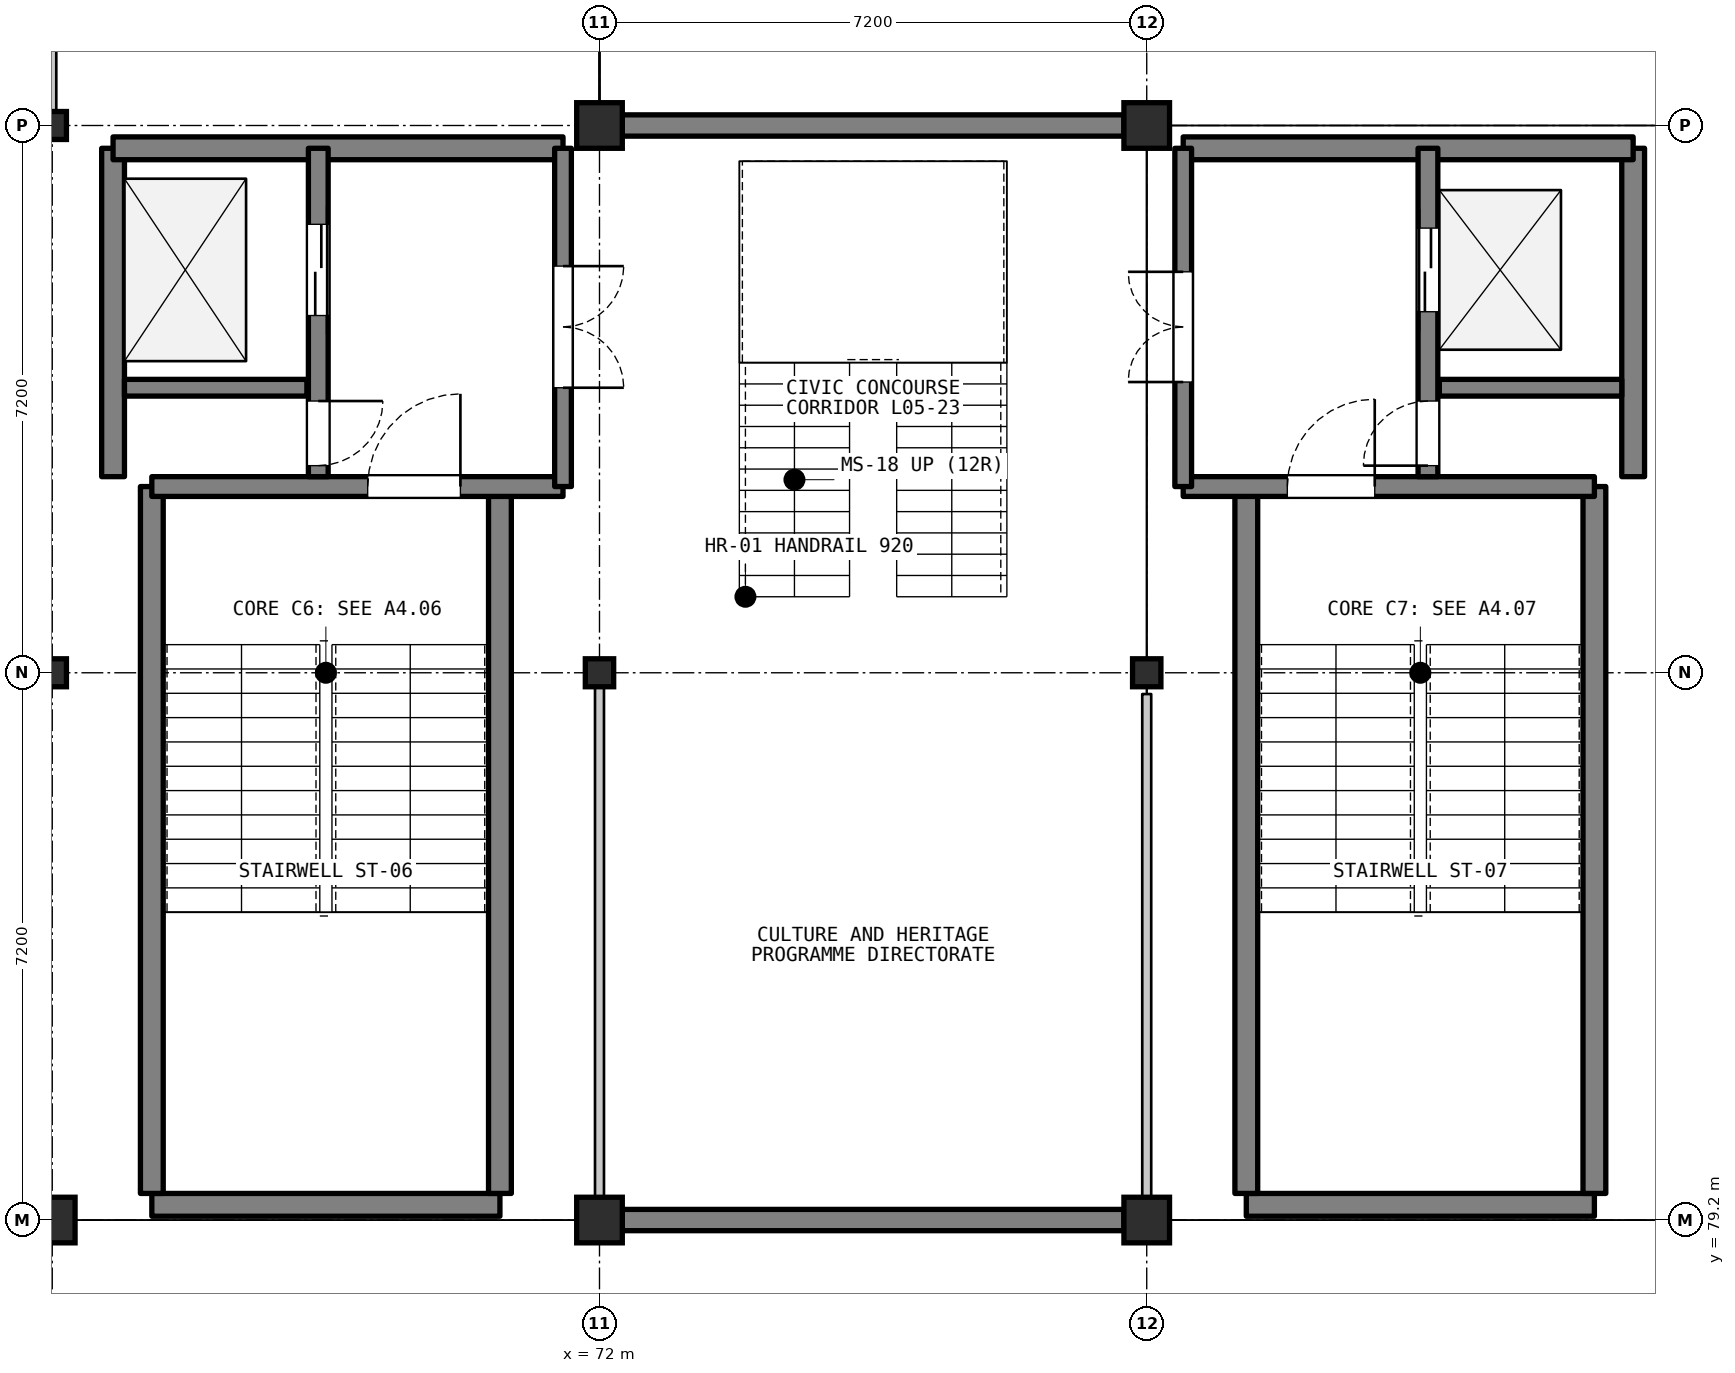
"""IFC4 building model, lengths in metres.
Left out: names, types, materials, properties, quantities, classifications, styles, units other than length and angle.
Written with IfcOpenShell. Run it as: python <this file> out.ifc"""

import sys

from ifc_helpers import new_model, si_unit, direction, frame, frame_2d, origin, origin_2d, place, context, subcontext, project, spatial, rectangle, i_section, extrude, element, fill, save


model = new_model("IFC4")
c1 = context("Model", 3, precision=1e-05, world=origin(), true_north=direction((0.0, 1.0)))
c2 = subcontext(c1, "Body", "Model", "MODEL_VIEW")
j1 = project(units=[si_unit("LENGTHUNIT", "METRE"), si_unit("PLANEANGLEUNIT", "RADIAN")], contexts=[c1])
p1 = place(None, origin())
s1 = spatial("IfcSite", under=j1, at=p1, CompositionType="ELEMENT")
p2 = place(p1, origin())
s2 = spatial("IfcBuilding", under=s1, at=p2, CompositionType="ELEMENT")
p3 = place(p2, frame((0.0, 0.0, 18.0)))
s3 = spatial("IfcBuildingStorey", under=s2, at=p3, CompositionType="ELEMENT", Elevation=18.0)
p4 = place(p3, frame((64.8, 79.2, 0.0), z_axis=(0.0, 0.0, 1.0), x_axis=(1.0, 0.0, 0.0)))
e1 = element("IfcColumn", 1, at=p4, inside=s3, PredefinedType="COLUMN", context=c2, shape_type="SweptSolid", body=[
    extrude(rectangle(XDim=0.6, YDim=0.6, at=origin_2d()), origin(), (0.0, 0.0, 1.0), 3.9),
])
for number, where, z_axis, x_axis in (
    (2, (64.8, 86.4, 0.0), (0.0, 0.0, 1.0), (1.0, 0.0, 0.0)),
    (3, (64.8, 93.6, 0.0), (0.0, 0.0, 1.0), (1.0, 0.0, 0.0)),
):
    element("IfcColumn", number, at=place(p3, frame(where, z_axis=z_axis, x_axis=x_axis)), inside=s3, PredefinedType="COLUMN", context=c2, shape_type="SweptSolid", body=[
        extrude(i_section(OverallWidth=0.373, OverallDepth=0.368, WebThickness=0.015, FlangeThickness=0.024, FilletRadius=0.015, at=origin_2d()), origin(), (0.0, 0.0, 1.0), 3.9),
    ])
p5 = place(p3, frame((72.0, 79.2, 0.0), z_axis=(0.0, 0.0, 1.0), x_axis=(1.0, 0.0, 0.0)))
e4 = element("IfcColumn", 4, at=p5, inside=s3, PredefinedType="COLUMN", context=c2, shape_type="SweptSolid", body=[
    extrude(rectangle(XDim=0.6, YDim=0.6, at=origin_2d()), origin(), (0.0, 0.0, 1.0), 3.9),
])
p6 = place(p3, frame((72.0, 86.4, 0.0), z_axis=(0.0, 0.0, 1.0), x_axis=(1.0, 0.0, 0.0)))
e5 = element("IfcColumn", 5, at=p6, inside=s3, PredefinedType="COLUMN", context=c2, shape_type="SweptSolid", body=[
    extrude(i_section(OverallWidth=0.373, OverallDepth=0.368, WebThickness=0.015, FlangeThickness=0.024, FilletRadius=0.015, at=origin_2d()), origin(), (0.0, 0.0, 1.0), 3.9),
])
for number, where, z_axis, x_axis in (
    (6, (72.0, 93.6, 0.0), (0.0, 0.0, 1.0), (1.0, 0.0, 0.0)),
    (7, (79.2, 79.2, 0.0), (0.0, 0.0, 1.0), (1.0, 0.0, 0.0)),
):
    element("IfcColumn", number, at=place(p3, frame(where, z_axis=z_axis, x_axis=x_axis)), inside=s3, PredefinedType="COLUMN", context=c2, shape_type="SweptSolid", body=[
        extrude(rectangle(XDim=0.6, YDim=0.6, at=origin_2d()), origin(), (0.0, 0.0, 1.0), 3.9),
    ])
p7 = place(p3, frame((79.2, 86.4, 0.0), z_axis=(0.0, 0.0, 1.0), x_axis=(1.0, 0.0, 0.0)))
e8 = element("IfcColumn", 8, at=p7, inside=s3, PredefinedType="COLUMN", context=c2, shape_type="SweptSolid", body=[
    extrude(i_section(OverallWidth=0.373, OverallDepth=0.368, WebThickness=0.015, FlangeThickness=0.024, FilletRadius=0.015, at=origin_2d()), origin(), (0.0, 0.0, 1.0), 3.9),
])
p8 = place(p3, frame((79.2, 93.6, 0.0), z_axis=(0.0, 0.0, 1.0), x_axis=(1.0, 0.0, 0.0)))
e9 = element("IfcColumn", 9, at=p8, inside=s3, PredefinedType="COLUMN", context=c2, shape_type="SweptSolid", body=[
    extrude(rectangle(XDim=0.6, YDim=0.6, at=origin_2d()), origin(), (0.0, 0.0, 1.0), 3.9),
])
for number, where, z_axis, x_axis in (
    (10, (78.9, 79.2, 0.0), (0.0, 0.0, 1.0), (-1.0, 0.0, 0.0)),
    (11, (72.3, 93.6, 0.0), (0.0, 0.0, 1.0), (1.0, 0.0, 0.0)),
):
    element("IfcWall", number, at=place(p3, frame(where, z_axis=z_axis, x_axis=x_axis)), inside=s3, PredefinedType="SOLIDWALL", context=c2, shape_type="SweptSolid", body=[
        extrude(rectangle(XDim=6.6, YDim=0.28, at=frame_2d((3.3, 0.0))), origin(), (0.0, 0.0, 1.0), 3.192),
    ])
p9 = place(p3, frame((66.11, 79.4, 0.0), z_axis=(0.0, 0.0, 1.0), x_axis=(1.0, 0.0, 0.0)))
e12 = element("IfcWall", 12, at=p9, inside=s3, PredefinedType="SHEAR", context=c2, shape_type="SweptSolid", body=[
    extrude(rectangle(XDim=4.58, YDim=0.3, at=frame_2d((2.29, 0.0))), origin(), (0.0, 0.0, 1.0), 3.72),
])
for number, where, z_axis, x_axis in (
    (13, (66.11, 79.55, 0.0), (0.0, 0.0, 1.0), (0.0, 1.0, 0.0)),
    (14, (70.69, 79.55, 0.0), (0.0, 0.0, 1.0), (0.0, 1.0, 0.0)),
):
    element("IfcWall", number, at=place(p3, frame(where, z_axis=z_axis, x_axis=x_axis)), inside=s3, PredefinedType="SHEAR", context=c2, shape_type="SweptSolid", body=[
        extrude(rectangle(XDim=9.3, YDim=0.3, at=frame_2d((4.65, 0.0))), origin(), (0.0, 0.0, 1.0), 3.72),
    ])
p10 = place(p3, frame((66.11, 88.85, 0.0), z_axis=(0.0, 0.0, 1.0), x_axis=(1.0, 0.0, 0.0)))
e15 = element("IfcWall", 15, at=p10, inside=s3, PredefinedType="SHEAR", context=c2, shape_type="SweptSolid", body=[
    extrude(rectangle(XDim=5.41, YDim=0.26, at=frame_2d((2.705, 0.0))), origin(), (0.0, 0.0, 1.0), 3.72),
])
p11 = place(p10, frame((2.84, 0.0, 0.0)))
e16 = element("IfcOpeningElement", 16, at=p11, cuts=e15, PredefinedType="OPENING", context=c2, shape_type="SweptSolid", body=[
    extrude(rectangle(XDim=1.22, YDim=2.15, at=frame_2d((0.61, 1.075))), frame((0.0, 0.14, 0.0), z_axis=(0.0, -1.0, 0.0), x_axis=(1.0, 0.0, 0.0)), (0.0, 0.0, 1.0), 0.28),
])
p12 = place(p3, frame((65.6, 88.98, 0.0), z_axis=(0.0, 0.0, 1.0), x_axis=(0.0, 1.0, 0.0)))
e17 = element("IfcWall", 17, at=p12, inside=s3, PredefinedType="SHEAR", context=c2, shape_type="SweptSolid", body=[
    extrude(rectangle(XDim=4.32, YDim=0.3, at=frame_2d((2.16, 0.0))), origin(), (0.0, 0.0, 1.0), 3.72),
])
p13 = place(p3, frame((65.6, 93.3, 0.0), z_axis=(0.0, 0.0, 1.0), x_axis=(1.0, 0.0, 0.0)))
e18 = element("IfcWall", 18, at=p13, inside=s3, PredefinedType="SHEAR", context=c2, shape_type="SweptSolid", body=[
    extrude(rectangle(XDim=5.92, YDim=0.3, at=frame_2d((2.96, 0.0))), origin(), (0.0, 0.0, 1.0), 3.72),
])
p14 = place(p3, frame((65.75, 90.15, 0.0), z_axis=(0.0, 0.0, 1.0), x_axis=(1.0, 0.0, 0.0)))
e19 = element("IfcWall", 19, at=p14, inside=s3, PredefinedType="SHEAR", context=c2, shape_type="SweptSolid", body=[
    extrude(rectangle(XDim=2.4, YDim=0.22, at=frame_2d((1.2, 0.0))), origin(), (0.0, 0.0, 1.0), 3.72),
])
p15 = place(p3, frame((68.3, 93.3, 0.0), z_axis=(0.0, 0.0, 1.0), x_axis=(0.0, -1.0, 0.0)))
e20 = element("IfcWall", 20, at=p15, inside=s3, PredefinedType="SHEAR", context=c2, shape_type="SweptSolid", body=[
    extrude(rectangle(XDim=4.32, YDim=0.26, at=frame_2d((2.16, 0.0))), origin(), (0.0, 0.0, 1.0), 3.72),
])
p16 = place(p15, frame((1.0, 0.0, 0.0)))
e21 = element("IfcOpeningElement", 21, at=p16, cuts=e20, PredefinedType="OPENING", context=c2, shape_type="SweptSolid", body=[
    extrude(rectangle(XDim=1.2, YDim=2.15, at=frame_2d((0.6, 1.075))), frame((0.0, 0.14, 0.0), z_axis=(0.0, -1.0, 0.0), x_axis=(1.0, 0.0, 0.0)), (0.0, 0.0, 1.0), 0.28),
])
p17 = place(p15, frame((3.325, 0.0, 0.0)))
e22 = element("IfcOpeningElement", 22, at=p17, cuts=e20, PredefinedType="OPENING", context=c2, shape_type="SweptSolid", body=[
    extrude(rectangle(XDim=0.85, YDim=2.05, at=frame_2d((0.425, 1.025))), frame((0.0, 0.14, 0.0), z_axis=(0.0, -1.0, 0.0), x_axis=(1.0, 0.0, 0.0)), (0.0, 0.0, 1.0), 0.28),
])
p18 = place(p3, frame((71.52, 93.3, 0.0), z_axis=(0.0, 0.0, 1.0), x_axis=(0.0, -1.0, 0.0)))
e23 = element("IfcWall", 23, at=p18, inside=s3, PredefinedType="SHEAR", context=c2, shape_type="SweptSolid", body=[
    extrude(rectangle(XDim=4.45, YDim=0.22, at=frame_2d((2.225, 0.0))), origin(), (0.0, 0.0, 1.0), 3.72),
])
p19 = place(p18, frame((1.55, 0.0, 0.0)))
e24 = element("IfcOpeningElement", 24, at=p19, cuts=e23, PredefinedType="OPENING", context=c2, shape_type="SweptSolid", body=[
    extrude(rectangle(XDim=1.6, YDim=2.2, at=frame_2d((0.8, 1.1))), frame((0.0, 0.12, 0.0), z_axis=(0.0, -1.0, 0.0), x_axis=(1.0, 0.0, 0.0)), (0.0, 0.0, 1.0), 0.24),
])
p20 = place(p3, frame((80.51, 79.4, 0.0), z_axis=(0.0, 0.0, 1.0), x_axis=(1.0, 0.0, 0.0)))
e25 = element("IfcWall", 25, at=p20, inside=s3, PredefinedType="SHEAR", context=c2, shape_type="SweptSolid", body=[
    extrude(rectangle(XDim=4.58, YDim=0.3, at=frame_2d((2.29, 0.0))), origin(), (0.0, 0.0, 1.0), 3.72),
])
for number, where, z_axis, x_axis in (
    (26, (80.51, 79.55, 0.0), (0.0, 0.0, 1.0), (0.0, 1.0, 0.0)),
    (27, (85.09, 79.55, 0.0), (0.0, 0.0, 1.0), (0.0, 1.0, 0.0)),
):
    element("IfcWall", number, at=place(p3, frame(where, z_axis=z_axis, x_axis=x_axis)), inside=s3, PredefinedType="SHEAR", context=c2, shape_type="SweptSolid", body=[
        extrude(rectangle(XDim=9.3, YDim=0.3, at=frame_2d((4.65, 0.0))), origin(), (0.0, 0.0, 1.0), 3.72),
    ])
p21 = place(p3, frame((79.68, 88.85, 0.0), z_axis=(0.0, 0.0, 1.0), x_axis=(1.0, 0.0, 0.0)))
e28 = element("IfcWall", 28, at=p21, inside=s3, PredefinedType="SHEAR", context=c2, shape_type="SweptSolid", body=[
    extrude(rectangle(XDim=5.41, YDim=0.26, at=frame_2d((2.705, 0.0))), origin(), (0.0, 0.0, 1.0), 3.72),
])
p22 = place(p21, frame((1.37, 0.0, 0.0)))
e29 = element("IfcOpeningElement", 29, at=p22, cuts=e28, PredefinedType="OPENING", context=c2, shape_type="SweptSolid", body=[
    extrude(rectangle(XDim=1.15, YDim=2.15, at=frame_2d((0.575, 1.075))), frame((0.0, 0.14, 0.0), z_axis=(0.0, -1.0, 0.0), x_axis=(1.0, 0.0, 0.0)), (0.0, 0.0, 1.0), 0.28),
])
p23 = place(p3, frame((85.6, 88.98, 0.0), z_axis=(0.0, 0.0, 1.0), x_axis=(0.0, 1.0, 0.0)))
e30 = element("IfcWall", 30, at=p23, inside=s3, PredefinedType="SHEAR", context=c2, shape_type="SweptSolid", body=[
    extrude(rectangle(XDim=4.32, YDim=0.3, at=frame_2d((2.16, 0.0))), origin(), (0.0, 0.0, 1.0), 3.72),
])
p24 = place(p3, frame((79.68, 93.3, 0.0), z_axis=(0.0, 0.0, 1.0), x_axis=(1.0, 0.0, 0.0)))
e31 = element("IfcWall", 31, at=p24, inside=s3, PredefinedType="SHEAR", context=c2, shape_type="SweptSolid", body=[
    extrude(rectangle(XDim=5.92, YDim=0.3, at=frame_2d((2.96, 0.0))), origin(), (0.0, 0.0, 1.0), 3.72),
])
p25 = place(p3, frame((83.05, 90.15, 0.0), z_axis=(0.0, 0.0, 1.0), x_axis=(1.0, 0.0, 0.0)))
e32 = element("IfcWall", 32, at=p25, inside=s3, PredefinedType="SHEAR", context=c2, shape_type="SweptSolid", body=[
    extrude(rectangle(XDim=2.4, YDim=0.22, at=frame_2d((1.2, 0.0))), origin(), (0.0, 0.0, 1.0), 3.72),
])
p26 = place(p3, frame((82.9, 88.98, 0.0), z_axis=(0.0, 0.0, 1.0), x_axis=(0.0, 1.0, 0.0)))
e33 = element("IfcWall", 33, at=p26, inside=s3, PredefinedType="SHEAR", context=c2, shape_type="SweptSolid", body=[
    extrude(rectangle(XDim=4.32, YDim=0.26, at=frame_2d((2.16, 0.0))), origin(), (0.0, 0.0, 1.0), 3.72),
])
p27 = place(p26, frame((2.17, 0.0, 0.0)))
e34 = element("IfcOpeningElement", 34, at=p27, cuts=e33, PredefinedType="OPENING", context=c2, shape_type="SweptSolid", body=[
    extrude(rectangle(XDim=1.1, YDim=2.15, at=frame_2d((0.55, 1.075))), frame((0.0, 0.14, 0.0), z_axis=(0.0, -1.0, 0.0), x_axis=(1.0, 0.0, 0.0)), (0.0, 0.0, 1.0), 0.28),
])
p28 = place(p26, frame((0.145, 0.0, 0.0)))
e35 = element("IfcOpeningElement", 35, at=p28, cuts=e33, PredefinedType="OPENING", context=c2, shape_type="SweptSolid", body=[
    extrude(rectangle(XDim=0.85, YDim=2.05, at=frame_2d((0.425, 1.025))), frame((0.0, 0.14, 0.0), z_axis=(0.0, -1.0, 0.0), x_axis=(1.0, 0.0, 0.0)), (0.0, 0.0, 1.0), 0.28),
])
p29 = place(p3, frame((79.68, 88.85, 0.0), z_axis=(0.0, 0.0, 1.0), x_axis=(0.0, 1.0, 0.0)))
e36 = element("IfcWall", 36, at=p29, inside=s3, PredefinedType="SHEAR", context=c2, shape_type="SweptSolid", body=[
    extrude(rectangle(XDim=4.45, YDim=0.22, at=frame_2d((2.225, 0.0))), origin(), (0.0, 0.0, 1.0), 3.72),
])
p30 = place(p29, frame((1.375, 0.0, 0.0)))
e37 = element("IfcOpeningElement", 37, at=p30, cuts=e36, PredefinedType="OPENING", context=c2, shape_type="SweptSolid", body=[
    extrude(rectangle(XDim=1.45, YDim=2.2, at=frame_2d((0.725, 1.1))), frame((0.0, 0.12, 0.0), z_axis=(0.0, -1.0, 0.0), x_axis=(1.0, 0.0, 0.0)), (0.0, 0.0, 1.0), 0.24),
])
p31 = place(p3, frame((64.8, 93.72, 0.0), z_axis=(0.0, 0.0, 1.0), x_axis=(0.0, 1.0, 0.0)))
e38 = element("IfcWall", 38, at=p31, inside=s3, PredefinedType="PARTITIONING", context=c2, shape_type="SweptSolid", body=[
    extrude(rectangle(XDim=6.96, YDim=0.106, at=frame_2d((3.48, 0.0))), origin(), (0.0, 0.0, 1.0), 3.108),
])
p32 = place(p3, frame((72.0, 79.32, 0.0), z_axis=(0.0, 0.0, 1.0), x_axis=(0.0, 1.0, 0.0)))
e39 = element("IfcWall", 39, at=p32, inside=s3, PredefinedType="PARTITIONING", context=c2, shape_type="SweptSolid", body=[
    extrude(rectangle(XDim=6.96, YDim=0.118, at=frame_2d((3.48, 0.0))), origin(), (0.0, 0.0, 1.0), 3.108),
])
p33 = place(p3, frame((79.2, 86.12, 0.0), z_axis=(0.0, 0.0, 1.0), x_axis=(0.0, -1.0, 0.0)))
e40 = element("IfcWall", 40, at=p33, inside=s3, PredefinedType="PARTITIONING", context=c2, shape_type="SweptSolid", body=[
    extrude(rectangle(XDim=6.64, YDim=0.118, at=frame_2d((3.32, 0.0))), origin(), (0.0, 0.0, 1.0), 3.177),
])
p34 = place(p11, origin())
e41 = element("IfcDoor", 41, at=p34, inside=s3, OperationType="SINGLE_SWING_RIGHT", PredefinedType="DOOR", context=c2, shape_type="SweptSolid", body=[
    extrude(rectangle(XDim=1.22, YDim=2.15, at=frame_2d((0.61, 1.075))), frame((0.0, 0.025, 0.0), z_axis=(0.0, -1.0, 0.0), x_axis=(1.0, 0.0, 0.0)), (0.0, 0.0, 1.0), 0.05),
])
fill(e16, e41)
p35 = place(p16, origin())
e42 = element("IfcDoor", 42, at=p35, inside=s3, OperationType="DOUBLE_DOOR_SLIDING", PredefinedType="DOOR", context=c2, shape_type="SweptSolid", body=[
    extrude(rectangle(XDim=1.2, YDim=2.15, at=frame_2d((0.6, 1.075))), frame((0.0, 0.025, 0.0), z_axis=(0.0, -1.0, 0.0), x_axis=(1.0, 0.0, 0.0)), (0.0, 0.0, 1.0), 0.05),
])
fill(e21, e42)
p36 = place(p17, origin())
e43 = element("IfcDoor", 43, at=p36, inside=s3, OperationType="SINGLE_SWING_LEFT", PredefinedType="DOOR", context=c2, shape_type="SweptSolid", body=[
    extrude(rectangle(XDim=0.85, YDim=2.05, at=frame_2d((0.425, 1.025))), frame((0.0, 0.025, 0.0), z_axis=(0.0, -1.0, 0.0), x_axis=(1.0, 0.0, 0.0)), (0.0, 0.0, 1.0), 0.05),
])
fill(e22, e43)
p37 = place(p19, origin())
e44 = element("IfcDoor", 44, at=p37, inside=s3, OperationType="DOUBLE_DOOR_SINGLE_SWING", PredefinedType="DOOR", context=c2, shape_type="SweptSolid", body=[
    extrude(rectangle(XDim=1.6, YDim=2.2, at=frame_2d((0.8, 1.1))), frame((0.0, 0.025, 0.0), z_axis=(0.0, -1.0, 0.0), x_axis=(1.0, 0.0, 0.0)), (0.0, 0.0, 1.0), 0.05),
])
fill(e24, e44)
p38 = place(p22, origin())
e45 = element("IfcDoor", 45, at=p38, inside=s3, OperationType="SINGLE_SWING_RIGHT", PredefinedType="DOOR", context=c2, shape_type="SweptSolid", body=[
    extrude(rectangle(XDim=1.15, YDim=2.15, at=frame_2d((0.575, 1.075))), frame((0.0, 0.025, 0.0), z_axis=(0.0, -1.0, 0.0), x_axis=(1.0, 0.0, 0.0)), (0.0, 0.0, 1.0), 0.05),
])
fill(e29, e45)
p39 = place(p27, origin())
e46 = element("IfcDoor", 46, at=p39, inside=s3, OperationType="DOUBLE_DOOR_SLIDING", PredefinedType="DOOR", context=c2, shape_type="SweptSolid", body=[
    extrude(rectangle(XDim=1.1, YDim=2.15, at=frame_2d((0.55, 1.075))), frame((0.0, 0.025, 0.0), z_axis=(0.0, -1.0, 0.0), x_axis=(1.0, 0.0, 0.0)), (0.0, 0.0, 1.0), 0.05),
])
fill(e34, e46)
p40 = place(p28, origin())
e47 = element("IfcDoor", 47, at=p40, inside=s3, OperationType="SINGLE_SWING_LEFT", PredefinedType="DOOR", context=c2, shape_type="SweptSolid", body=[
    extrude(rectangle(XDim=0.85, YDim=2.05, at=frame_2d((0.425, 1.025))), frame((0.0, 0.025, 0.0), z_axis=(0.0, -1.0, 0.0), x_axis=(1.0, 0.0, 0.0)), (0.0, 0.0, 1.0), 0.05),
])
fill(e35, e47)
p41 = place(p30, origin())
e48 = element("IfcDoor", 48, at=p41, inside=s3, OperationType="DOUBLE_DOOR_SINGLE_SWING", PredefinedType="DOOR", context=c2, shape_type="SweptSolid", body=[
    extrude(rectangle(XDim=1.45, YDim=2.2, at=frame_2d((0.725, 1.1))), frame((0.0, 0.025, 0.0), z_axis=(0.0, -1.0, 0.0), x_axis=(1.0, 0.0, 0.0)), (0.0, 0.0, 1.0), 0.05),
])
fill(e37, e48)
save(model, sys.argv[1])
